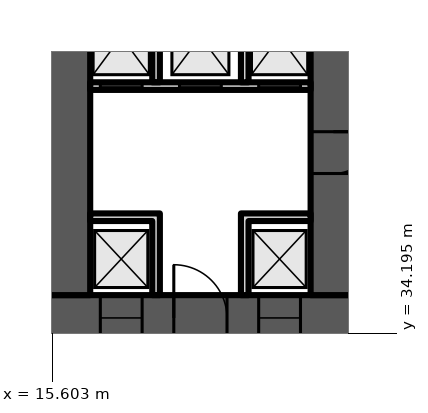
"""IFC4 building model, lengths in metres.
Left out: names, types, materials, properties, quantities, classifications, styles, units other than length and angle.
Written with IfcOpenShell. Run it as: python <this file> out.ifc"""

import sys

from ifc_helpers import new_model, si_unit, direction, frame, frame_2d, origin, place, context, subcontext, project, spatial, polyline, rectangle, outline, extrude, element, fill, save


model = new_model("IFC4")
c1 = context("Model", 3, precision=1e-05, world=origin(), true_north=direction((0.0, 1.0)))
c2 = subcontext(c1, "Body", "Model", "MODEL_VIEW")
j1 = project(units=[si_unit("LENGTHUNIT", "METRE"), si_unit("PLANEANGLEUNIT", "RADIAN")], contexts=[c1])
p1 = place(None, origin())
s1 = spatial("IfcSite", under=j1, at=p1, CompositionType="ELEMENT")
p2 = place(p1, origin())
s2 = spatial("IfcBuilding", under=s1, at=p2, CompositionType="ELEMENT")
p3 = place(p2, frame((0.0, 0.0, 66.7)))
s3 = spatial("IfcBuildingStorey", under=s2, at=p3, CompositionType="ELEMENT", Elevation=66.7)
p4 = place(p3, frame((9.0, 34.6, 0.0), z_axis=(0.0, 0.0, 1.0), x_axis=(1.0, 0.0, 0.0)))
e1 = element("IfcWall", 1, at=p4, inside=s3, PredefinedType="SHEAR", context=c2, shape_type="SweptSolid", body=[
    extrude(rectangle(XDim=56.0, YDim=1.2, at=frame_2d((28.0, 0.0))), origin(), (0.0, 0.0, 1.0), 3.6),
])
p5 = place(p4, frame((2.0, 0.0, 0.0)))
e2 = element("IfcOpeningElement", 2, at=p5, cuts=e1, PredefinedType="OPENING", context=c2, shape_type="SweptSolid", body=[
    extrude(rectangle(XDim=1.0, YDim=2.1, at=frame_2d((0.5, 1.05))), frame((0.0, 0.61, 0.0), z_axis=(0.0, -1.0, 0.0), x_axis=(1.0, 0.0, 0.0)), (0.0, 0.0, 1.0), 1.22),
])
p6 = place(p4, frame((4.6, 0.0, 0.0)))
e3 = element("IfcOpeningElement", 3, at=p6, cuts=e1, PredefinedType="OPENING", context=c2, shape_type="SweptSolid", body=[
    extrude(rectangle(XDim=1.0, YDim=2.1, at=frame_2d((0.5, 1.05))), frame((0.0, 0.61, 0.0), z_axis=(0.0, -1.0, 0.0), x_axis=(1.0, 0.0, 0.0)), (0.0, 0.0, 1.0), 1.22),
])
p7 = place(p4, frame((7.867, 0.0, 0.0)))
e4 = element("IfcOpeningElement", 4, at=p7, cuts=e1, PredefinedType="OPENING", context=c2, shape_type="SweptSolid", body=[
    extrude(rectangle(XDim=1.1, YDim=2.1, at=frame_2d((0.55, 1.05))), frame((0.0, 0.61, 0.0), z_axis=(0.0, -1.0, 0.0), x_axis=(1.0, 0.0, 0.0)), (0.0, 0.0, 1.0), 1.22),
])
p8 = place(p4, frame((12.033, 0.0, 0.0)))
e5 = element("IfcOpeningElement", 5, at=p8, cuts=e1, PredefinedType="OPENING", context=c2, shape_type="SweptSolid", body=[
    extrude(rectangle(XDim=1.1, YDim=2.1, at=frame_2d((0.55, 1.05))), frame((0.0, 0.61, 0.0), z_axis=(0.0, -1.0, 0.0), x_axis=(1.0, 0.0, 0.0)), (0.0, 0.0, 1.0), 1.22),
])
p9 = place(p4, frame((9.8, 0.0, 0.0)))
e6 = element("IfcOpeningElement", 6, at=p9, cuts=e1, PredefinedType="OPENING", context=c2, shape_type="SweptSolid", body=[
    extrude(rectangle(XDim=1.4, YDim=2.1, at=frame_2d((0.7, 1.05))), frame((0.0, 0.61, 0.0), z_axis=(0.0, -1.0, 0.0), x_axis=(1.0, 0.0, 0.0)), (0.0, 0.0, 1.0), 1.22),
])
p10 = place(p4, frame((14.65, 0.0, 0.0)))
e7 = element("IfcOpeningElement", 7, at=p10, cuts=e1, PredefinedType="OPENING", context=c2, shape_type="SweptSolid", body=[
    extrude(rectangle(XDim=1.2, YDim=2.1, at=frame_2d((0.6, 1.05))), frame((0.0, 0.61, 0.0), z_axis=(0.0, -1.0, 0.0), x_axis=(1.0, 0.0, 0.0)), (0.0, 0.0, 1.0), 1.22),
])
p11 = place(p4, frame((21.867, 0.0, 0.0)))
e8 = element("IfcOpeningElement", 8, at=p11, cuts=e1, PredefinedType="OPENING", context=c2, shape_type="SweptSolid", body=[
    extrude(rectangle(XDim=1.1, YDim=2.1, at=frame_2d((0.55, 1.05))), frame((0.0, 0.61, 0.0), z_axis=(0.0, -1.0, 0.0), x_axis=(1.0, 0.0, 0.0)), (0.0, 0.0, 1.0), 1.22),
])
p12 = place(p4, frame((26.033, 0.0, 0.0)))
e9 = element("IfcOpeningElement", 9, at=p12, cuts=e1, PredefinedType="OPENING", context=c2, shape_type="SweptSolid", body=[
    extrude(rectangle(XDim=1.1, YDim=2.1, at=frame_2d((0.55, 1.05))), frame((0.0, 0.61, 0.0), z_axis=(0.0, -1.0, 0.0), x_axis=(1.0, 0.0, 0.0)), (0.0, 0.0, 1.0), 1.22),
])
p13 = place(p4, frame((23.8, 0.0, 0.0)))
e10 = element("IfcOpeningElement", 10, at=p13, cuts=e1, PredefinedType="OPENING", context=c2, shape_type="SweptSolid", body=[
    extrude(rectangle(XDim=1.4, YDim=2.1, at=frame_2d((0.7, 1.05))), frame((0.0, 0.61, 0.0), z_axis=(0.0, -1.0, 0.0), x_axis=(1.0, 0.0, 0.0)), (0.0, 0.0, 1.0), 1.22),
])
p14 = place(p4, frame((28.867, 0.0, 0.0)))
e11 = element("IfcOpeningElement", 11, at=p14, cuts=e1, PredefinedType="OPENING", context=c2, shape_type="SweptSolid", body=[
    extrude(rectangle(XDim=1.1, YDim=2.1, at=frame_2d((0.55, 1.05))), frame((0.0, 0.61, 0.0), z_axis=(0.0, -1.0, 0.0), x_axis=(1.0, 0.0, 0.0)), (0.0, 0.0, 1.0), 1.22),
])
p15 = place(p4, frame((33.033, 0.0, 0.0)))
e12 = element("IfcOpeningElement", 12, at=p15, cuts=e1, PredefinedType="OPENING", context=c2, shape_type="SweptSolid", body=[
    extrude(rectangle(XDim=1.1, YDim=2.1, at=frame_2d((0.55, 1.05))), frame((0.0, 0.61, 0.0), z_axis=(0.0, -1.0, 0.0), x_axis=(1.0, 0.0, 0.0)), (0.0, 0.0, 1.0), 1.22),
])
p16 = place(p4, frame((40.15, 0.0, 0.0)))
e13 = element("IfcOpeningElement", 13, at=p16, cuts=e1, PredefinedType="OPENING", context=c2, shape_type="SweptSolid", body=[
    extrude(rectangle(XDim=1.2, YDim=2.1, at=frame_2d((0.6, 1.05))), frame((0.0, 0.61, 0.0), z_axis=(0.0, -1.0, 0.0), x_axis=(1.0, 0.0, 0.0)), (0.0, 0.0, 1.0), 1.22),
])
p17 = place(p4, frame((44.8, 0.0, 0.0)))
e14 = element("IfcOpeningElement", 14, at=p17, cuts=e1, PredefinedType="OPENING", context=c2, shape_type="SweptSolid", body=[
    extrude(rectangle(XDim=1.4, YDim=2.1, at=frame_2d((0.7, 1.05))), frame((0.0, 0.61, 0.0), z_axis=(0.0, -1.0, 0.0), x_axis=(1.0, 0.0, 0.0)), (0.0, 0.0, 1.0), 1.22),
])
p18 = place(p4, frame((49.867, 0.0, 0.0)))
e15 = element("IfcOpeningElement", 15, at=p18, cuts=e1, PredefinedType="OPENING", context=c2, shape_type="SweptSolid", body=[
    extrude(rectangle(XDim=1.1, YDim=2.1, at=frame_2d((0.55, 1.05))), frame((0.0, 0.61, 0.0), z_axis=(0.0, -1.0, 0.0), x_axis=(1.0, 0.0, 0.0)), (0.0, 0.0, 1.0), 1.22),
])
p19 = place(p4, frame((53.5, 0.0, 0.0)))
e16 = element("IfcOpeningElement", 16, at=p19, cuts=e1, PredefinedType="OPENING", context=c2, shape_type="SweptSolid", body=[
    extrude(rectangle(XDim=1.1, YDim=2.1, at=frame_2d((0.55, 1.05))), frame((0.0, 0.61, 0.0), z_axis=(0.0, -1.0, 0.0), x_axis=(1.0, 0.0, 0.0)), (0.0, 0.0, 1.0), 1.22),
])
p20 = place(p4, frame((51.567, 0.0, 0.0)))
e17 = element("IfcOpeningElement", 17, at=p20, cuts=e1, PredefinedType="OPENING", context=c2, shape_type="SweptSolid", body=[
    extrude(rectangle(XDim=1.4, YDim=2.1, at=frame_2d((0.7, 1.05))), frame((0.0, 0.61, 0.0), z_axis=(0.0, -1.0, 0.0), x_axis=(1.0, 0.0, 0.0)), (0.0, 0.0, 1.0), 1.22),
])
p21 = place(p3, frame((16.0, 35.2, 0.0), z_axis=(0.0, 0.0, 1.0), x_axis=(0.0, 1.0, 0.0)))
e18 = element("IfcWall", 18, at=p21, inside=s3, PredefinedType="SHEAR", context=c2, shape_type="SweptSolid", body=[
    extrude(rectangle(XDim=12.943, YDim=1.2, at=frame_2d((6.471, 0.0))), origin(), (0.0, 0.0, 1.0), 3.6),
])
p22 = place(p21, frame((9.6, 0.0, 0.0)))
e19 = element("IfcOpeningElement", 19, at=p22, cuts=e18, PredefinedType="OPENING", context=c2, shape_type="SweptSolid", body=[
    extrude(rectangle(XDim=1.0, YDim=2.1, at=frame_2d((0.5, 1.05))), frame((0.0, 0.61, 0.0), z_axis=(0.0, -1.0, 0.0), x_axis=(1.0, 0.0, 0.0)), (0.0, 0.0, 1.0), 1.22),
])
p23 = place(p3, frame((23.0, 35.2, 0.0), z_axis=(0.0, 0.0, 1.0), x_axis=(0.0, 1.0, 0.0)))
e20 = element("IfcWall", 20, at=p23, inside=s3, PredefinedType="SHEAR", context=c2, shape_type="SweptSolid", body=[
    extrude(rectangle(XDim=13.555, YDim=1.2, at=frame_2d((6.778, 0.0))), origin(), (0.0, 0.0, 1.0), 3.6),
])
p24 = place(p23, frame((10.414, 0.0, 0.0)))
e21 = element("IfcOpeningElement", 21, at=p24, cuts=e20, PredefinedType="OPENING", context=c2, shape_type="SweptSolid", body=[
    extrude(rectangle(XDim=1.0, YDim=2.1, at=frame_2d((0.5, 1.05))), frame((0.0, 0.61, 0.0), z_axis=(0.0, -1.0, 0.0), x_axis=(1.0, 0.0, 0.0)), (0.0, 0.0, 1.0), 1.22),
])
p25 = place(p23, frame((3.2, 0.0, 0.0)))
e22 = element("IfcOpeningElement", 22, at=p25, cuts=e20, PredefinedType="OPENING", context=c2, shape_type="SweptSolid", body=[
    extrude(rectangle(XDim=1.1, YDim=2.1, at=frame_2d((0.55, 1.05))), frame((0.0, 0.61, 0.0), z_axis=(0.0, -1.0, 0.0), x_axis=(1.0, 0.0, 0.0)), (0.0, 0.0, 1.0), 1.22),
])
p26 = place(p3, frame((16.6, 40.7, 0.0), z_axis=(0.0, 0.0, 1.0), x_axis=(1.0, 0.0, 0.0)))
e23 = element("IfcWall", 23, at=p26, inside=s3, PredefinedType="PARTITIONING", context=c2, shape_type="SweptSolid", body=[
    extrude(rectangle(XDim=5.8, YDim=0.2, at=frame_2d((2.9, 0.0))), origin(), (0.0, 0.0, 1.0), 3.2),
])
p27 = place(p26, frame((0.267, 0.0, 0.0)))
e24 = element("IfcOpeningElement", 24, at=p27, cuts=e23, PredefinedType="OPENING", context=c2, shape_type="SweptSolid", body=[
    extrude(rectangle(XDim=1.1, YDim=2.1, at=frame_2d((0.55, 1.05))), frame((0.0, 0.11, 0.0), z_axis=(0.0, -1.0, 0.0), x_axis=(1.0, 0.0, 0.0)), (0.0, 0.0, 1.0), 0.22),
])
p28 = place(p26, frame((2.35, 0.0, 0.0)))
e25 = element("IfcOpeningElement", 25, at=p28, cuts=e23, PredefinedType="OPENING", context=c2, shape_type="SweptSolid", body=[
    extrude(rectangle(XDim=1.1, YDim=2.1, at=frame_2d((0.55, 1.05))), frame((0.0, 0.11, 0.0), z_axis=(0.0, -1.0, 0.0), x_axis=(1.0, 0.0, 0.0)), (0.0, 0.0, 1.0), 0.22),
])
p29 = place(p26, frame((4.433, 0.0, 0.0)))
e26 = element("IfcOpeningElement", 26, at=p29, cuts=e23, PredefinedType="OPENING", context=c2, shape_type="SweptSolid", body=[
    extrude(rectangle(XDim=1.1, YDim=2.1, at=frame_2d((0.55, 1.05))), frame((0.0, 0.11, 0.0), z_axis=(0.0, -1.0, 0.0), x_axis=(1.0, 0.0, 0.0)), (0.0, 0.0, 1.0), 0.22),
])
p30 = place(p3, frame((0.0, 0.0, -0.0)))
e27 = element("IfcWall", 27, at=p30, inside=s3, PredefinedType="PARTITIONING", context=c2, shape_type="SweptSolid", body=[
    extrude(outline(polyline([(18.233, 37.15), (16.6, 37.15), (16.6, 37.35), (18.233, 37.35), (18.433, 37.35), (18.433, 35.2), (18.233, 35.2), (18.233, 37.15)])), origin(), (0.0, 0.0, 1.0), 3.2),
])
p31 = place(p3, frame((0.0, 0.0, -0.0)))
e28 = element("IfcWall", 28, at=p31, inside=s3, PredefinedType="PARTITIONING", context=c2, shape_type="SweptSolid", body=[
    extrude(outline(polyline([(20.567, 37.35), (20.767, 37.35), (22.4, 37.35), (22.4, 37.15), (20.767, 37.15), (20.767, 35.2), (20.567, 35.2), (20.567, 37.35)])), origin(), (0.0, 0.0, 1.0), 3.2),
])
p32 = place(p3, frame((0.0, 0.0, -0.0)))
e29 = element("IfcWall", 29, at=p32, inside=s3, PredefinedType="PARTITIONING", context=c2, shape_type="SweptSolid", body=[
    extrude(outline(polyline([(18.433, 40.8), (18.233, 40.8), (18.233, 43.8), (16.6, 43.8), (16.6, 44.0), (22.4, 44.0), (22.4, 43.8), (20.767, 43.8), (20.767, 40.8), (20.567, 40.8), (20.567, 43.8), (18.433, 43.8), (18.433, 40.8)])), origin(), (0.0, 0.0, 1.0), 3.2),
])
p33 = place(p7, origin())
e30 = element("IfcDoor", 30, at=p33, inside=s3, OperationType="DOUBLE_DOOR_SLIDING", PredefinedType="DOOR", context=c2, shape_type="SweptSolid", body=[
    extrude(rectangle(XDim=1.1, YDim=2.1, at=frame_2d((0.55, 1.05))), frame((0.0, 0.025, 0.0), z_axis=(0.0, -1.0, 0.0), x_axis=(1.0, 0.0, 0.0)), (0.0, 0.0, 1.0), 0.05),
])
fill(e4, e30)
p34 = place(p8, origin())
e31 = element("IfcDoor", 31, at=p34, inside=s3, OperationType="DOUBLE_DOOR_SLIDING", PredefinedType="DOOR", context=c2, shape_type="SweptSolid", body=[
    extrude(rectangle(XDim=1.1, YDim=2.1, at=frame_2d((0.55, 1.05))), frame((0.0, 0.025, 0.0), z_axis=(0.0, -1.0, 0.0), x_axis=(1.0, 0.0, 0.0)), (0.0, 0.0, 1.0), 0.05),
])
fill(e5, e31)
p35 = place(p9, origin())
e32 = element("IfcDoor", 32, at=p35, inside=s3, OperationType="DOUBLE_DOOR_SINGLE_SWING", PredefinedType="DOOR", context=c2, shape_type="SweptSolid", body=[
    extrude(rectangle(XDim=1.4, YDim=2.1, at=frame_2d((0.7, 1.05))), frame((0.0, 0.025, 0.0), z_axis=(0.0, -1.0, 0.0), x_axis=(1.0, 0.0, 0.0)), (0.0, 0.0, 1.0), 0.05),
])
fill(e6, e32)
p36 = place(p27, origin())
e33 = element("IfcDoor", 33, at=p36, inside=s3, OperationType="DOUBLE_DOOR_SLIDING", PredefinedType="DOOR", context=c2, shape_type="SweptSolid", body=[
    extrude(rectangle(XDim=1.1, YDim=2.1, at=frame_2d((0.55, 1.05))), frame((0.0, 0.025, 0.0), z_axis=(0.0, -1.0, 0.0), x_axis=(1.0, 0.0, 0.0)), (0.0, 0.0, 1.0), 0.05),
])
fill(e24, e33)
p37 = place(p28, origin())
e34 = element("IfcDoor", 34, at=p37, inside=s3, OperationType="DOUBLE_DOOR_SLIDING", PredefinedType="DOOR", context=c2, shape_type="SweptSolid", body=[
    extrude(rectangle(XDim=1.1, YDim=2.1, at=frame_2d((0.55, 1.05))), frame((0.0, 0.025, 0.0), z_axis=(0.0, -1.0, 0.0), x_axis=(1.0, 0.0, 0.0)), (0.0, 0.0, 1.0), 0.05),
])
fill(e25, e34)
p38 = place(p29, origin())
e35 = element("IfcDoor", 35, at=p38, inside=s3, OperationType="DOUBLE_DOOR_SLIDING", PredefinedType="DOOR", context=c2, shape_type="SweptSolid", body=[
    extrude(rectangle(XDim=1.1, YDim=2.1, at=frame_2d((0.55, 1.05))), frame((0.0, 0.025, 0.0), z_axis=(0.0, -1.0, 0.0), x_axis=(1.0, 0.0, 0.0)), (0.0, 0.0, 1.0), 0.05),
])
fill(e26, e35)
p39 = place(p25, origin())
e36 = element("IfcDoor", 36, at=p39, inside=s3, OperationType="SINGLE_SWING_RIGHT", PredefinedType="DOOR", context=c2, shape_type="SweptSolid", body=[
    extrude(rectangle(XDim=1.1, YDim=2.1, at=frame_2d((0.55, 1.05))), frame((0.0, 0.025, 0.0), z_axis=(0.0, -1.0, 0.0), x_axis=(1.0, 0.0, 0.0)), (0.0, 0.0, 1.0), 0.05),
])
fill(e22, e36)
save(model, sys.argv[1])
